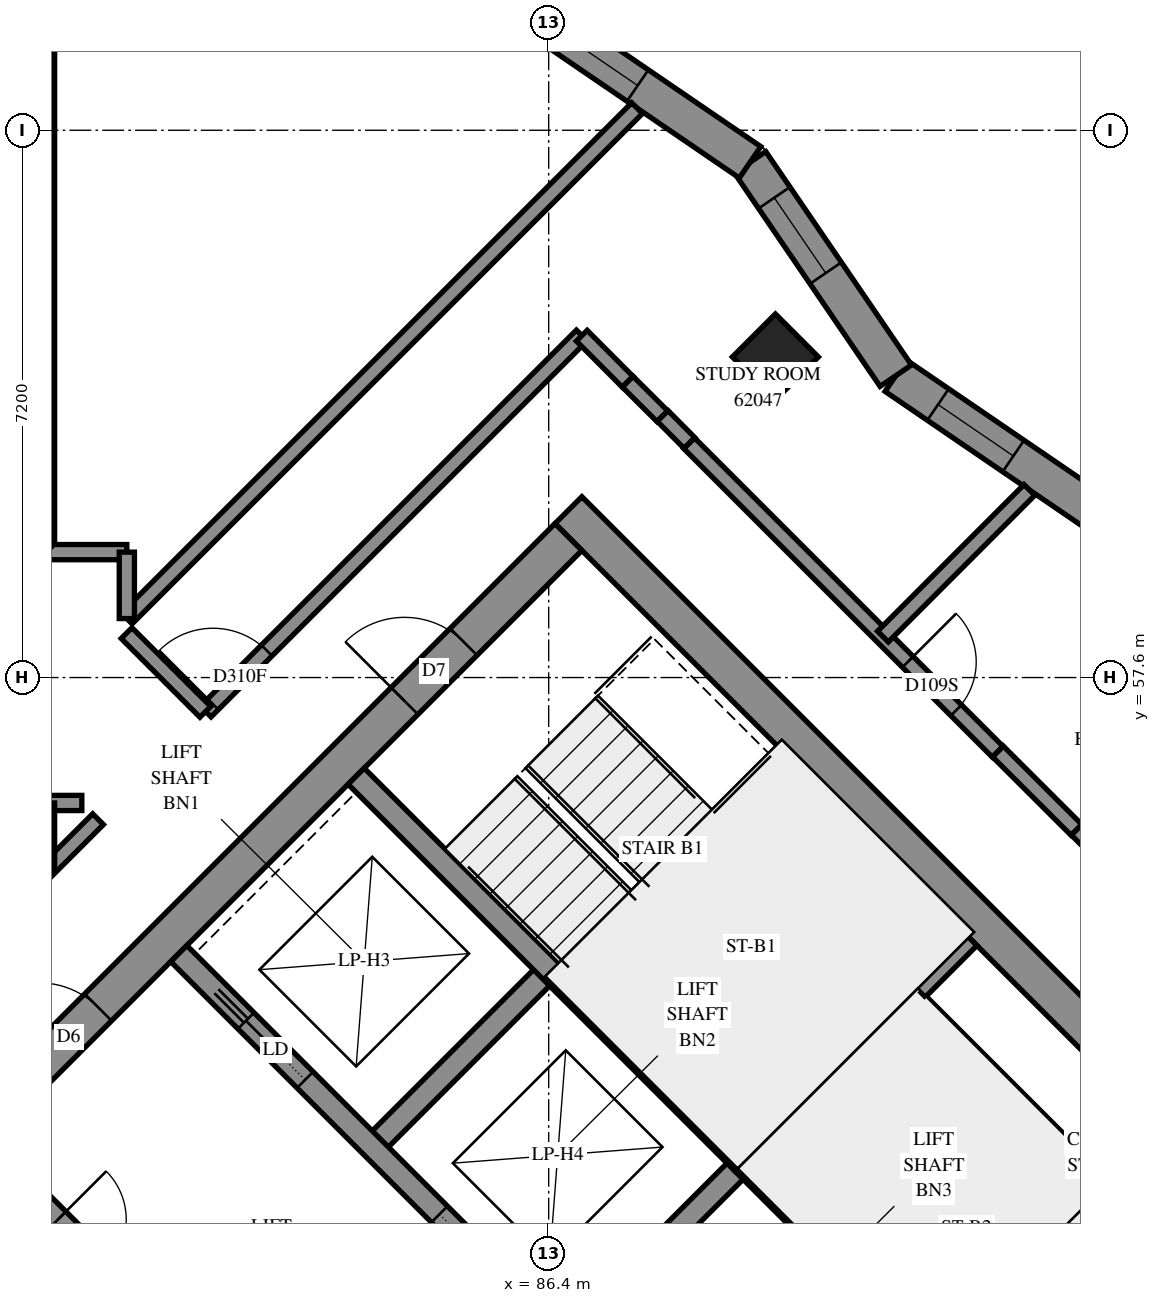
"""IFC4 building model, lengths in metres.
Left out: names, types, materials, properties, quantities, classifications, styles, units other than length and angle.
Written with IfcOpenShell. Run it as: python <this file> out.ifc"""

import sys

from ifc_helpers import new_model, si_unit, direction, frame, frame_2d, origin, origin_2d, place, context, subcontext, project, spatial, polyline, rectangle, outline, extrude, element, fill, save


model = new_model("IFC4")
c1 = context("Model", 3, precision=1e-05, world=origin(), true_north=direction((0.0, 1.0)))
c2 = subcontext(c1, "Body", "Model", "MODEL_VIEW")
j1 = project(units=[si_unit("LENGTHUNIT", "METRE"), si_unit("PLANEANGLEUNIT", "RADIAN")], contexts=[c1])
p1 = place(None, origin())
s1 = spatial("IfcSite", under=j1, at=p1, CompositionType="ELEMENT")
p2 = place(p1, origin())
s2 = spatial("IfcBuilding", under=s1, at=p2, CompositionType="ELEMENT")
p3 = place(p2, frame((0.0, 0.0, 227.0)))
s3 = spatial("IfcBuildingStorey", under=s2, at=p3, CompositionType="ELEMENT", Elevation=227.0)
p4 = place(p3, frame((89.382, 61.818, 0.0), z_axis=(0.0, 0.0, 1.0), x_axis=(0.7071067812, -0.7071067812, 0.0)))
e1 = element("IfcColumn", 1, at=p4, inside=s3, PredefinedType="COLUMN", context=c2, shape_type="SweptSolid", body=[
    extrude(rectangle(XDim=0.8, YDim=0.8, at=origin_2d()), origin(), (0.0, 0.0, 1.0), 3.1),
])
p5 = place(p3, frame((86.66, 59.802, -0.3), z_axis=(0.0, 0.0, 1.0), x_axis=(0.7071067812, -0.7071067812, 0.0)))
e2 = element("IfcWall", 2, at=p5, inside=s3, PredefinedType="SHEAR", context=c2, shape_type="SweptSolid", body=[
    extrude(rectangle(XDim=15.4, YDim=0.5, at=frame_2d((7.7, 0.0))), origin(), (0.0, 0.0, 1.0), 2.7),
])
p6 = place(p5, frame((10.5, 0.0, 0.3)))
e3 = element("IfcOpeningElement", 3, at=p6, cuts=e2, PredefinedType="OPENING", context=c2, shape_type="SweptSolid", body=[
    extrude(rectangle(XDim=0.8, YDim=2.1, at=frame_2d((0.4, 1.05))), frame((0.0, 0.26, 0.0), z_axis=(0.0, -1.0, 0.0), x_axis=(1.0, 0.0, 0.0)), (0.0, 0.0, 1.0), 0.52),
])
p7 = place(p3, frame((76.478, 49.267, -0.3), z_axis=(0.0, 0.0, 1.0), x_axis=(0.7071067812, 0.7071067812, 0.0)))
e4 = element("IfcWall", 4, at=p7, inside=s3, PredefinedType="SHEAR", context=c2, shape_type="SweptSolid", body=[
    extrude(rectangle(XDim=14.4, YDim=0.5, at=frame_2d((7.2, 0.0))), origin(), (0.0, 0.0, 1.0), 2.7),
])
p8 = place(p7, frame((4.55, 0.0, 0.3)))
e5 = element("IfcOpeningElement", 5, at=p8, cuts=e4, PredefinedType="OPENING", context=c2, shape_type="SweptSolid", body=[
    extrude(rectangle(XDim=1.1, YDim=2.1, at=frame_2d((0.55, 1.05))), frame((0.0, 0.26, 0.0), z_axis=(0.0, -1.0, 0.0), x_axis=(1.0, 0.0, 0.0)), (0.0, 0.0, 1.0), 0.52),
])
p9 = place(p7, frame((11.35, 0.0, 0.3)))
e6 = element("IfcOpeningElement", 6, at=p9, cuts=e4, PredefinedType="OPENING", context=c2, shape_type="SweptSolid", body=[
    extrude(rectangle(XDim=1.1, YDim=2.1, at=frame_2d((0.55, 1.05))), frame((0.0, 0.26, 0.0), z_axis=(0.0, -1.0, 0.0), x_axis=(1.0, 0.0, 0.0)), (0.0, 0.0, 1.0), 0.52),
])
p10 = place(p3, frame((84.079, 51.423, 0.0), z_axis=(0.0, 0.0, 1.0), x_axis=(0.7071219326, 0.7070916295, 0.0)))
e7 = element("IfcWall", 7, at=p10, inside=s3, PredefinedType="SOLIDWALL", context=c2, shape_type="SweptSolid", body=[
    extrude(rectangle(XDim=3.3, YDim=0.3, at=frame_2d((1.65, 0.0))), origin(), (0.0, 0.0, 1.0), 3.1),
])
p11 = place(p3, frame((86.625, 48.878, 0.0), z_axis=(0.0, 0.0, 1.0), x_axis=(0.7071067812, 0.7071067812, 0.0)))
e8 = element("IfcWall", 8, at=p11, inside=s3, PredefinedType="SOLIDWALL", context=c2, shape_type="SweptSolid", body=[
    extrude(rectangle(XDim=3.3, YDim=0.3, at=frame_2d((1.65, 0.0))), origin(), (0.0, 0.0, 1.0), 3.1),
])
p12 = place(p3, frame((78.988, 51.423, 0.0), z_axis=(0.0, 0.0, 1.0), x_axis=(0.7071067812, -0.7071067812, 0.0)))
e9 = element("IfcWall", 9, at=p12, inside=s3, PredefinedType="SOLIDWALL", context=c2, shape_type="SweptSolid", body=[
    extrude(rectangle(XDim=14.4, YDim=0.3, at=frame_2d((7.2, 0.0))), origin(), (0.0, 0.0, 1.0), 3.1),
])
p13 = place(p12, frame((1.35, 0.0, 0.0)))
e10 = element("IfcOpeningElement", 10, at=p13, cuts=e9, PredefinedType="OPENING", context=c2, shape_type="SweptSolid", body=[
    extrude(rectangle(XDim=0.9, YDim=2.1, at=frame_2d((0.45, 1.05))), frame((0.0, 0.16, 0.0), z_axis=(0.0, -1.0, 0.0), x_axis=(1.0, 0.0, 0.0)), (0.0, 0.0, 1.0), 0.32),
])
p14 = place(p12, frame((4.95, 0.0, 0.0)))
e11 = element("IfcOpeningElement", 11, at=p14, cuts=e9, PredefinedType="OPENING", context=c2, shape_type="SweptSolid", body=[
    extrude(rectangle(XDim=0.9, YDim=2.1, at=frame_2d((0.45, 1.05))), frame((0.0, 0.16, 0.0), z_axis=(0.0, -1.0, 0.0), x_axis=(1.0, 0.0, 0.0)), (0.0, 0.0, 1.0), 0.32),
])
p15 = place(p12, frame((8.55, 0.0, 0.0)))
e12 = element("IfcOpeningElement", 12, at=p15, cuts=e9, PredefinedType="OPENING", context=c2, shape_type="SweptSolid", body=[
    extrude(rectangle(XDim=0.9, YDim=2.1, at=frame_2d((0.45, 1.05))), frame((0.0, 0.16, 0.0), z_axis=(0.0, -1.0, 0.0), x_axis=(1.0, 0.0, 0.0)), (0.0, 0.0, 1.0), 0.32),
])
p16 = place(p12, frame((12.05, 0.0, 0.0)))
e13 = element("IfcOpeningElement", 13, at=p16, cuts=e9, PredefinedType="OPENING", context=c2, shape_type="SweptSolid", body=[
    extrude(rectangle(XDim=1.1, YDim=2.1, at=frame_2d((0.55, 1.05))), frame((0.0, 0.16, 0.0), z_axis=(0.0, -1.0, 0.0), x_axis=(1.0, 0.0, 0.0)), (0.0, 0.0, 1.0), 0.32),
])
p17 = place(p3, frame((81.534, 53.969, 0.0), z_axis=(0.0, 0.0, 1.0), x_axis=(0.707103309, -0.7071102534, 0.0)))
e14 = element("IfcWall", 14, at=p17, inside=s3, PredefinedType="SOLIDWALL", context=c2, shape_type="SweptSolid", body=[
    extrude(rectangle(XDim=14.4, YDim=0.3, at=frame_2d((7.2, 0.0))), origin(), (0.0, 0.0, 1.0), 3.1),
])
p18 = place(p17, frame((1.25, 0.0, 0.0)))
e15 = element("IfcOpeningElement", 15, at=p18, cuts=e14, PredefinedType="OPENING", context=c2, shape_type="SweptSolid", body=[
    extrude(rectangle(XDim=1.1, YDim=2.1, at=frame_2d((0.55, 1.05))), frame((0.0, 0.16, 0.0), z_axis=(0.0, -1.0, 0.0), x_axis=(1.0, 0.0, 0.0)), (0.0, 0.0, 1.0), 0.32),
])
p19 = place(p17, frame((4.85, 0.0, 0.0)))
e16 = element("IfcOpeningElement", 16, at=p19, cuts=e14, PredefinedType="OPENING", context=c2, shape_type="SweptSolid", body=[
    extrude(rectangle(XDim=1.1, YDim=2.1, at=frame_2d((0.55, 1.05))), frame((0.0, 0.16, 0.0), z_axis=(0.0, -1.0, 0.0), x_axis=(1.0, 0.0, 0.0)), (0.0, 0.0, 1.0), 0.32),
])
p20 = place(p17, frame((8.45, 0.0, 0.0)))
e17 = element("IfcOpeningElement", 17, at=p20, cuts=e14, PredefinedType="OPENING", context=c2, shape_type="SweptSolid", body=[
    extrude(rectangle(XDim=1.1, YDim=2.1, at=frame_2d((0.55, 1.05))), frame((0.0, 0.16, 0.0), z_axis=(0.0, -1.0, 0.0), x_axis=(1.0, 0.0, 0.0)), (0.0, 0.0, 1.0), 0.32),
])
p21 = place(p17, frame((12.05, 0.0, 0.0)))
e18 = element("IfcOpeningElement", 18, at=p21, cuts=e14, PredefinedType="OPENING", context=c2, shape_type="SweptSolid", body=[
    extrude(rectangle(XDim=1.1, YDim=2.1, at=frame_2d((0.55, 1.05))), frame((0.0, 0.16, 0.0), z_axis=(0.0, -1.0, 0.0), x_axis=(1.0, 0.0, 0.0)), (0.0, 0.0, 1.0), 0.32),
])
for number, where, z_axis, x_axis in (
    (19, (83.867, 56.302, 0.0), (0.0, 0.0, 1.0), (0.707, -0.707, 0.0)),
    (20, (88.958, 51.211, 0.0), (0.0, 0.0, 1.0), (0.707, -0.707, 0.0)),
):
    element("IfcWall", number, at=place(p3, frame(where, z_axis=z_axis, x_axis=x_axis)), inside=s3, PredefinedType="SOLIDWALL", context=c2, shape_type="SweptSolid", body=[
        extrude(rectangle(XDim=7.2, YDim=0.3, at=frame_2d((3.6, 0.0))), origin(), (0.0, 0.0, 1.0), 3.1),
    ])
p22 = place(p3, frame((88.958, 51.211, 0.0), z_axis=(0.0, 0.0, 1.0), x_axis=(0.7071067812, 0.7071067812, 0.0)))
e21 = element("IfcWall", 21, at=p22, inside=s3, PredefinedType="SOLIDWALL", context=c2, shape_type="SweptSolid", body=[
    extrude(rectangle(XDim=4.2, YDim=0.3, at=frame_2d((2.1, 0.0))), origin(), (0.0, 0.0, 1.0), 3.1),
])
p23 = place(p3, frame((93.774, 59.654, 0.0), z_axis=(0.0, 0.0, 1.0), x_axis=(-0.8258911763, 0.5638295531, 0.0)))
e22 = element("IfcWall", 22, at=p23, inside=s3, PredefinedType="SOLIDWALL", context=c2, shape_type="SweptSolid", body=[
    extrude(outline(polyline([(-0.047, -0.25), (3.353, -0.25), (3.447, 0.25), (0.047, 0.25), (-0.047, -0.25)])), origin(), (0.0, 0.0, 1.0), 3.1),
])
p24 = place(p23, frame((1.527, 0.0, 0.45)))
e23 = element("IfcOpeningElement", 23, at=p24, cuts=e22, PredefinedType="OPENING", context=c2, shape_type="SweptSolid", body=[
    extrude(rectangle(XDim=1.2, YDim=2.5, at=frame_2d((0.6, 1.25))), frame((0.0, 0.26, 0.0), z_axis=(0.0, -1.0, 0.0), x_axis=(1.0, 0.0, 0.0)), (0.0, 0.0, 1.0), 0.52),
])
p25 = place(p3, frame((90.966, 61.571, 0.0), z_axis=(0.0, 0.0, 1.0), x_axis=(-0.5638295531, 0.8258911763, 0.0)))
e24 = element("IfcWall", 24, at=p25, inside=s3, PredefinedType="SOLIDWALL", context=c2, shape_type="SweptSolid", body=[
    extrude(outline(polyline([(0.047, -0.25), (3.447, -0.25), (3.353, 0.25), (-0.047, 0.25), (0.047, -0.25)])), origin(), (0.0, 0.0, 1.0), 3.1),
])
p26 = place(p25, frame((1.635, 0.0, 0.45)))
e25 = element("IfcOpeningElement", 25, at=p26, cuts=e24, PredefinedType="OPENING", context=c2, shape_type="SweptSolid", body=[
    extrude(rectangle(XDim=1.2, YDim=2.5, at=frame_2d((0.6, 1.25))), frame((0.0, 0.26, 0.0), z_axis=(0.0, -1.0, 0.0), x_axis=(1.0, 0.0, 0.0)), (0.0, 0.0, 1.0), 0.52),
])
p27 = place(p3, frame((89.049, 64.379, 0.0), z_axis=(0.0, 0.0, 1.0), x_axis=(-0.8258911763, 0.5638295531, 0.0)))
e26 = element("IfcWall", 26, at=p27, inside=s3, PredefinedType="SOLIDWALL", context=c2, shape_type="SweptSolid", body=[
    extrude(outline(polyline([(-0.047, -0.25), (3.353, -0.25), (3.447, 0.25), (0.047, 0.25), (-0.047, -0.25)])), origin(), (0.0, 0.0, 1.0), 3.1),
])
p28 = place(p27, frame((1.79, 0.0, 0.45)))
e27 = element("IfcOpeningElement", 27, at=p28, cuts=e26, PredefinedType="OPENING", context=c2, shape_type="SweptSolid", body=[
    extrude(rectangle(XDim=1.2, YDim=2.5, at=frame_2d((0.6, 1.25))), frame((0.0, 0.26, 0.0), z_axis=(0.0, -1.0, 0.0), x_axis=(1.0, 0.0, 0.0)), (0.0, 0.0, 1.0), 0.52),
])
p29 = place(p3, frame((91.313, 53.354, 0.0), z_axis=(0.0, 0.0, 1.0), x_axis=(0.7071067812, -0.7071067812, 0.0)))
e28 = element("IfcWall", 28, at=p29, inside=s3, PredefinedType="PARTITIONING", context=c2, shape_type="SweptSolid", body=[
    extrude(rectangle(XDim=5.95, YDim=0.15, at=frame_2d((2.975, 0.0))), origin(), (0.0, 0.0, 1.0), 3.1),
])
p30 = place(p3, frame((79.8, 59.25, 0.0), z_axis=(0.0, 0.0, 1.0), x_axis=(0.0, 1.0, 0.0)))
e29 = element("IfcWall", 29, at=p30, inside=s3, PredefinedType="PARTITIONING", context=c2, shape_type="SweptSolid", body=[
    extrude(rectangle(XDim=14.528, YDim=0.2, at=frame_2d((7.264, 0.0))), origin(), (0.0, 0.0, 1.0), 3.1),
])
p31 = place(p3, frame((80.849, 58.377, 0.0), z_axis=(0.0, 0.0, 1.0), x_axis=(0.7071120471, 0.7071015152, 0.0)))
e30 = element("IfcWall", 30, at=p31, inside=s3, PredefinedType="PARTITIONING", context=c2, shape_type="SweptSolid", body=[
    extrude(rectangle(XDim=9.495, YDim=0.2, at=frame_2d((4.747, 0.0))), origin(), (0.0, 0.0, 1.0), 3.1),
])
p32 = place(p3, frame((93.346, 55.599, 0.0), z_axis=(0.0, 0.0, 1.0), x_axis=(0.7071067812, -0.7071067812, 0.0)))
e31 = element("IfcWall", 31, at=p32, inside=s3, PredefinedType="PARTITIONING", context=c2, shape_type="SweptSolid", body=[
    extrude(rectangle(XDim=9.201, YDim=0.2, at=frame_2d((4.601, 0.0))), origin(), (0.0, 0.0, 1.0), 3.1),
])
p33 = place(p3, frame((81.887, 57.153, 0.0), z_axis=(0.0, 0.0, 1.0), x_axis=(0.7071067812, 0.7071067812, 0.0)))
e32 = element("IfcWall", 32, at=p33, inside=s3, PredefinedType="PARTITIONING", context=c2, shape_type="SweptSolid", body=[
    extrude(rectangle(XDim=6.997, YDim=0.2, at=frame_2d((3.499, 0.0))), origin(), (0.0, 0.0, 1.0), 3.1),
])
p34 = place(p33, frame((0.136, 0.0, 0.0)))
e33 = element("IfcOpeningElement", 33, at=p34, cuts=e32, PredefinedType="OPENING", context=c2, shape_type="SweptSolid", body=[
    extrude(rectangle(XDim=1.0, YDim=2.1, at=frame_2d((0.5, 1.05))), frame((0.0, 0.11, 0.0), z_axis=(0.0, -1.0, 0.0), x_axis=(1.0, 0.0, 0.0)), (0.0, 0.0, 1.0), 0.22),
])
p35 = place(p3, frame((88.247, 60.683, 0.0), z_axis=(0.0, 0.0, 1.0), x_axis=(0.7071067812, -0.7071067812, 0.0)))
e34 = element("IfcWall", 34, at=p35, inside=s3, PredefinedType="PARTITIONING", context=c2, shape_type="SweptSolid", body=[
    extrude(rectangle(XDim=5.742, YDim=0.2, at=frame_2d((2.871, 0.0))), origin(), (0.0, 0.0, 1.0), 3.1),
])
p36 = place(p35, frame((4.069, 0.0, 0.0)))
e35 = element("IfcOpeningElement", 35, at=p36, cuts=e34, PredefinedType="OPENING", context=c2, shape_type="SweptSolid", body=[
    extrude(rectangle(XDim=0.9, YDim=2.1, at=frame_2d((0.45, 1.05))), frame((0.0, 0.11, 0.0), z_axis=(0.0, -1.0, 0.0), x_axis=(1.0, 0.0, 0.0)), (0.0, 0.0, 1.0), 0.22),
])
p37 = place(p3, frame((78.535, 53.801, 0.0), z_axis=(0.0, 0.0, 1.0), x_axis=(0.7071067812, 0.7071067812, 0.0)))
e36 = element("IfcWall", 36, at=p37, inside=s3, PredefinedType="PARTITIONING", context=c2, shape_type="SweptSolid", body=[
    extrude(rectangle(XDim=2.738, YDim=0.2, at=frame_2d((1.369, 0.0))), origin(), (0.0, 0.0, 1.0), 3.1),
])
p38 = place(p3, frame((77.552, 55.95, 0.0), z_axis=(0.0, 0.0, 1.0), x_axis=(1.0, 0.0, 0.0)))
e37 = element("IfcWall", 37, at=p38, inside=s3, PredefinedType="PARTITIONING", context=c2, shape_type="SweptSolid", body=[
    extrude(rectangle(XDim=2.706, YDim=0.2, at=frame_2d((1.353, 0.0))), origin(), (0.0, 0.0, 1.0), 3.1),
])
p39 = place(p3, frame((90.797, 58.139, 0.0), z_axis=(0.0, 0.0, 1.0), x_axis=(0.7066482226, 0.7075650426, 0.0)))
e38 = element("IfcWall", 38, at=p39, inside=s3, PredefinedType="PARTITIONING", context=c2, shape_type="SweptSolid", body=[
    extrude(rectangle(XDim=2.727, YDim=0.2, at=frame_2d((1.363, 0.0))), origin(), (0.0, 0.0, 1.0), 3.1),
])
p40 = place(p3, frame((80.847, 58.185, 0.0), z_axis=(0.0, 0.0, 1.0), x_axis=(0.7071067812, -0.7071067812, 0.0)))
e39 = element("IfcWall", 39, at=p40, inside=s3, PredefinedType="PARTITIONING", context=c2, shape_type="SweptSolid", body=[
    extrude(rectangle(XDim=1.465, YDim=0.2, at=frame_2d((0.733, 0.0))), origin(), (0.0, 0.0, 1.0), 3.1),
])
p41 = place(p3, frame((92.311, 56.627, 0.0), z_axis=(0.0, 0.0, 1.0), x_axis=(0.7077922938, -0.7064206033, 0.0)))
e40 = element("IfcWall", 40, at=p41, inside=s3, PredefinedType="PARTITIONING", context=c2, shape_type="SweptSolid", body=[
    extrude(rectangle(XDim=1.458, YDim=0.2, at=frame_2d((0.729, 0.0))), origin(), (0.0, 0.0, 1.0), 3.1),
])
p42 = place(p3, frame((79.8, 59.25, 0.0), z_axis=(0.0, 0.0, 1.0), x_axis=(1.0, 0.0, 0.0)))
e41 = element("IfcWall", 41, at=p42, inside=s3, PredefinedType="PARTITIONING", context=c2, shape_type="SweptSolid", body=[
    extrude(rectangle(XDim=1.05, YDim=0.2, at=frame_2d((0.525, 0.0))), origin(), (0.0, 0.0, 1.0), 3.1),
])
p43 = place(p3, frame((79.8, 55.064, 0.0), z_axis=(0.0, 0.0, 1.0), x_axis=(0.0, 1.0, 0.0)))
e42 = element("IfcWall", 42, at=p43, inside=s3, PredefinedType="PARTITIONING", context=c2, shape_type="SweptSolid", body=[
    extrude(rectangle(XDim=0.886, YDim=0.2, at=frame_2d((0.443, 0.0))), origin(), (0.0, 0.0, 1.0), 3.1),
])
p44 = place(p3, frame((80.85, 58.376, 0.0), z_axis=(0.0, 0.0, 1.0), x_axis=(0.0, 1.0, 0.0)))
e43 = element("IfcWall", 43, at=p44, inside=s3, PredefinedType="PARTITIONING", context=c2, shape_type="SweptSolid", body=[
    extrude(rectangle(XDim=0.874, YDim=0.2, at=frame_2d((0.437, 0.0))), origin(), (0.0, 0.0, 1.0), 3.1),
])
p45 = place(p3, frame((86.835, 62.097, 0.0), z_axis=(0.0, 0.0, 1.0), x_axis=(0.7059370453, -0.7082745852, 0.0)))
e44 = element("IfcWall", 44, at=p45, inside=s3, PredefinedType="PARTITIONING", context=c2, shape_type="SweptSolid", body=[
    extrude(rectangle(XDim=0.856, YDim=0.2, at=frame_2d((0.428, 0.0))), origin(), (0.0, 0.0, 1.0), 3.1),
])
p46 = place(p3, frame((87.44, 61.492, 0.0), z_axis=(0.0, 0.0, 1.0), x_axis=(0.7086591505, -0.7055509963, 0.0)))
e45 = element("IfcWall", 45, at=p46, inside=s3, PredefinedType="PARTITIONING", context=c2, shape_type="SweptSolid", body=[
    extrude(rectangle(XDim=0.643, YDim=0.2, at=frame_2d((0.322, 0.0))), origin(), (0.0, 0.0, 1.0), 3.1),
])
p47 = place(p3, frame((87.899, 61.041, 0.0), z_axis=(0.0, 0.0, 1.0), x_axis=(0.7051008166, -0.7091070712, 0.0)))
e46 = element("IfcWall", 46, at=p47, inside=s3, PredefinedType="PARTITIONING", context=c2, shape_type="SweptSolid", body=[
    extrude(rectangle(XDim=0.499, YDim=0.2, at=frame_2d((0.25, 0.0))), origin(), (0.0, 0.0, 1.0), 3.1),
])
p48 = place(p24, origin())
e47 = element("IfcWindow", 47, at=p48, inside=s3, PartitioningType="SINGLE_PANEL", PredefinedType="WINDOW", context=c2, shape_type="SweptSolid", body=[
    extrude(rectangle(XDim=1.2, YDim=2.5, at=frame_2d((0.6, 1.25))), frame((0.0, 0.18, 0.0), z_axis=(0.0, -1.0, 0.0), x_axis=(1.0, 0.0, 0.0)), (0.0, 0.0, 1.0), 0.06),
])
fill(e23, e47)
p49 = place(p26, origin())
e48 = element("IfcWindow", 48, at=p49, inside=s3, PartitioningType="SINGLE_PANEL", PredefinedType="WINDOW", context=c2, shape_type="SweptSolid", body=[
    extrude(rectangle(XDim=1.2, YDim=2.5, at=frame_2d((0.6, 1.25))), frame((0.0, 0.18, 0.0), z_axis=(0.0, -1.0, 0.0), x_axis=(1.0, 0.0, 0.0)), (0.0, 0.0, 1.0), 0.06),
])
fill(e25, e48)
p50 = place(p28, origin())
e49 = element("IfcWindow", 49, at=p50, inside=s3, PartitioningType="SINGLE_PANEL", PredefinedType="WINDOW", context=c2, shape_type="SweptSolid", body=[
    extrude(rectangle(XDim=1.2, YDim=2.5, at=frame_2d((0.6, 1.25))), frame((0.0, 0.18, 0.0), z_axis=(0.0, -1.0, 0.0), x_axis=(1.0, 0.0, 0.0)), (0.0, 0.0, 1.0), 0.06),
])
fill(e27, e49)
p51 = place(p8, origin())
e50 = element("IfcDoor", 50, at=p51, inside=s3, OperationType="DOUBLE_DOOR_SINGLE_SWING", PredefinedType="DOOR", context=c2, shape_type="SweptSolid", body=[
    extrude(rectangle(XDim=1.1, YDim=2.1, at=frame_2d((0.55, 1.05))), frame((0.0, 0.025, 0.0), z_axis=(0.0, -1.0, 0.0), x_axis=(1.0, 0.0, 0.0)), (0.0, 0.0, 1.0), 0.05),
])
fill(e5, e50)
p52 = place(p9, origin())
e51 = element("IfcDoor", 51, at=p52, inside=s3, OperationType="SINGLE_SWING_LEFT", PredefinedType="DOOR", context=c2, shape_type="SweptSolid", body=[
    extrude(rectangle(XDim=1.1, YDim=2.1, at=frame_2d((0.55, 1.05))), frame((0.0, 0.025, 0.0), z_axis=(0.0, -1.0, 0.0), x_axis=(1.0, 0.0, 0.0)), (0.0, 0.0, 1.0), 0.05),
])
fill(e6, e51)
p53 = place(p13, origin())
e52 = element("IfcDoor", 52, at=p53, inside=s3, OperationType="SINGLE_SWING_LEFT", PredefinedType="DOOR", context=c2, shape_type="SweptSolid", body=[
    extrude(rectangle(XDim=0.9, YDim=2.1, at=frame_2d((0.45, 1.05))), frame((0.0, 0.025, 0.0), z_axis=(0.0, -1.0, 0.0), x_axis=(1.0, 0.0, 0.0)), (0.0, 0.0, 1.0), 0.05),
])
fill(e10, e52)
p54 = place(p18, origin())
e53 = element("IfcDoor", 53, at=p54, inside=s3, OperationType="SLIDING_TO_LEFT", PredefinedType="DOOR", context=c2, shape_type="SweptSolid", body=[
    extrude(rectangle(XDim=1.1, YDim=2.1, at=frame_2d((0.55, 1.05))), frame((0.0, 0.025, 0.0), z_axis=(0.0, -1.0, 0.0), x_axis=(1.0, 0.0, 0.0)), (0.0, 0.0, 1.0), 0.05),
])
fill(e15, e53)
p55 = place(p19, origin())
e54 = element("IfcDoor", 54, at=p55, inside=s3, OperationType="SLIDING_TO_RIGHT", PredefinedType="DOOR", context=c2, shape_type="SweptSolid", body=[
    extrude(rectangle(XDim=1.1, YDim=2.1, at=frame_2d((0.55, 1.05))), frame((0.0, 0.025, 0.0), z_axis=(0.0, -1.0, 0.0), x_axis=(1.0, 0.0, 0.0)), (0.0, 0.0, 1.0), 0.05),
])
fill(e16, e54)
p56 = place(p34, origin())
e55 = element("IfcDoor", 55, at=p56, inside=s3, OperationType="SINGLE_SWING_RIGHT", PredefinedType="DOOR", context=c2, shape_type="SweptSolid", body=[
    extrude(rectangle(XDim=1.0, YDim=2.1, at=frame_2d((0.5, 1.05))), frame((0.0, 0.025, 0.0), z_axis=(0.0, -1.0, 0.0), x_axis=(1.0, 0.0, 0.0)), (0.0, 0.0, 1.0), 0.05),
])
fill(e33, e55)
p57 = place(p36, origin())
e56 = element("IfcDoor", 56, at=p57, inside=s3, OperationType="SINGLE_SWING_RIGHT", PredefinedType="DOOR", context=c2, shape_type="SweptSolid", body=[
    extrude(rectangle(XDim=0.9, YDim=2.1, at=frame_2d((0.45, 1.05))), frame((0.0, 0.025, 0.0), z_axis=(0.0, -1.0, 0.0), x_axis=(1.0, 0.0, 0.0)), (0.0, 0.0, 1.0), 0.05),
])
fill(e35, e56)
save(model, sys.argv[1])
